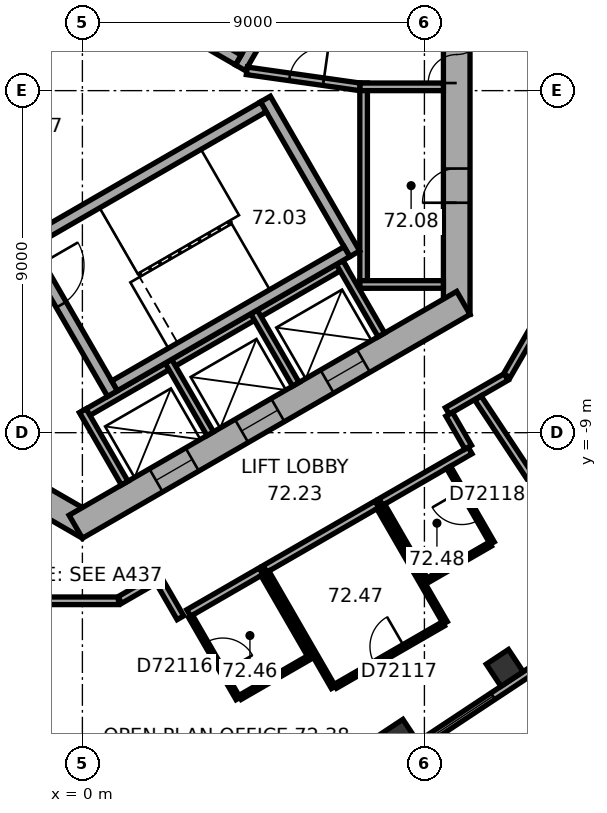
"""IFC4 building model, lengths in metres.
Left out: names, types, materials, properties, quantities, classifications, styles, units other than length and angle.
Written with IfcOpenShell. Run it as: python <this file> out.ifc"""

import sys

from ifc_helpers import new_model, si_unit, direction, frame, frame_2d, origin, origin_2d, place, context, subcontext, project, spatial, rectangle, extrude, element, fill, save


model = new_model("IFC4")
c1 = context("Model", 3, precision=1e-05, world=origin(), true_north=direction((0.0, 1.0)))
c2 = subcontext(c1, "Body", "Model", "MODEL_VIEW")
j1 = project(units=[si_unit("LENGTHUNIT", "METRE"), si_unit("PLANEANGLEUNIT", "RADIAN")], contexts=[c1])
p1 = place(None, origin())
s1 = spatial("IfcSite", under=j1, at=p1, CompositionType="ELEMENT")
p2 = place(p1, origin())
s2 = spatial("IfcBuilding", under=s1, at=p2, CompositionType="ELEMENT")
p3 = place(p2, frame((0.0, 0.0, 293.1)))
s3 = spatial("IfcBuildingStorey", under=s2, at=p3, CompositionType="ELEMENT", Elevation=293.1)
for number, where, z_axis, x_axis in (
    (1, (8.335, -17.028, 0.0), (0.0, 0.0, 1.0), (0.834, 0.552, 0.0)),
    (2, (11.113, -15.189, 0.0), (0.0, 0.0, 1.0), (0.834, 0.552, 0.0)),
):
    element("IfcColumn", number, at=place(p3, frame(where, z_axis=z_axis, x_axis=x_axis)), inside=s3, PredefinedType="COLUMN", context=c2, shape_type="SweptSolid", body=[
        extrude(rectangle(XDim=0.7, YDim=0.7, at=origin_2d()), origin(), (0.0, 0.0, 1.0), 3.7),
    ])
p4 = place(p3, frame((9.85, -5.889, 0.0), z_axis=(0.0, 0.0, 1.0), x_axis=(0.0, 1.0, 0.0)))
e3 = element("IfcWall", 3, at=p4, inside=s3, PredefinedType="SHEAR", context=c2, shape_type="SweptSolid", body=[
    extrude(rectangle(XDim=11.778, YDim=0.7, at=frame_2d((5.889, 0.0))), origin(), (0.0, 0.0, 1.0), 3.7),
])
p5 = place(p4, frame((6.089, 0.0, 0.0)))
e4 = element("IfcOpeningElement", 4, at=p5, cuts=e3, PredefinedType="OPENING", context=c2, shape_type="SweptSolid", body=[
    extrude(rectangle(XDim=1.5, YDim=2.1, at=frame_2d((0.75, 1.05))), frame((0.0, 0.36, 0.0), z_axis=(0.0, -1.0, 0.0), x_axis=(1.0, 0.0, 0.0)), (0.0, 0.0, 1.0), 0.72),
])
p6 = place(p4, frame((2.939, 0.0, 0.0)))
e5 = element("IfcOpeningElement", 5, at=p6, cuts=e3, PredefinedType="OPENING", context=c2, shape_type="SweptSolid", body=[
    extrude(rectangle(XDim=0.9, YDim=2.1, at=frame_2d((0.45, 1.05))), frame((0.0, 0.36, 0.0), z_axis=(0.0, -1.0, 0.0), x_axis=(1.0, 0.0, 0.0)), (0.0, 0.0, 1.0), 0.72),
])
p7 = place(p3, frame((-10.025, -5.586, 0.0), z_axis=(0.0, 0.0, 1.0), x_axis=(0.866026453023, -0.499998182661, 0.0)))
e6 = element("IfcWall", 6, at=p7, inside=s3, PredefinedType="SHEAR", context=c2, shape_type="SweptSolid", body=[
    extrude(rectangle(XDim=11.778, YDim=0.7, at=frame_2d((5.889, 0.0))), origin(), (0.0, 0.0, 1.0), 3.7),
])
p8 = place(p7, frame((6.089, 0.0, 0.0)))
e7 = element("IfcOpeningElement", 7, at=p8, cuts=e6, PredefinedType="OPENING", context=c2, shape_type="SweptSolid", body=[
    extrude(rectangle(XDim=1.5, YDim=2.1, at=frame_2d((0.75, 1.05))), frame((0.0, 0.36, 0.0), z_axis=(0.0, -1.0, 0.0), x_axis=(1.0, 0.0, 0.0)), (0.0, 0.0, 1.0), 0.72),
])
p9 = place(p7, frame((1.539, 0.0, 0.0)))
e8 = element("IfcOpeningElement", 8, at=p9, cuts=e6, PredefinedType="OPENING", context=c2, shape_type="SweptSolid", body=[
    extrude(rectangle(XDim=1.1, YDim=2.1, at=frame_2d((0.55, 1.05))), frame((0.0, 0.36, 0.0), z_axis=(0.0, -1.0, 0.0), x_axis=(1.0, 0.0, 0.0)), (0.0, 0.0, 1.0), 0.72),
])
p10 = place(p7, frame((4.139, 0.0, 0.0)))
e9 = element("IfcOpeningElement", 9, at=p10, cuts=e6, PredefinedType="OPENING", context=c2, shape_type="SweptSolid", body=[
    extrude(rectangle(XDim=1.1, YDim=2.1, at=frame_2d((0.55, 1.05))), frame((0.0, 0.36, 0.0), z_axis=(0.0, -1.0, 0.0), x_axis=(1.0, 0.0, 0.0)), (0.0, 0.0, 1.0), 0.72),
])
p11 = place(p3, frame((-0.175, -11.475, 0.0), z_axis=(0.0, 0.0, 1.0), x_axis=(0.866026453023, 0.499998182661, 0.0)))
e10 = element("IfcWall", 10, at=p11, inside=s3, PredefinedType="SHEAR", context=c2, shape_type="SweptSolid", body=[
    extrude(rectangle(XDim=11.778, YDim=0.7, at=frame_2d((5.889, 0.0))), origin(), (0.0, 0.0, 1.0), 3.7),
])
p12 = place(p11, frame((2.439, 0.0, 0.0)))
e11 = element("IfcOpeningElement", 11, at=p12, cuts=e10, PredefinedType="OPENING", context=c2, shape_type="SweptSolid", body=[
    extrude(rectangle(XDim=1.1, YDim=2.1, at=frame_2d((0.55, 1.05))), frame((0.0, 0.36, 0.0), z_axis=(0.0, -1.0, 0.0), x_axis=(1.0, 0.0, 0.0)), (0.0, 0.0, 1.0), 0.72),
])
p13 = place(p11, frame((5.039, 0.0, 0.0)))
e12 = element("IfcOpeningElement", 12, at=p13, cuts=e10, PredefinedType="OPENING", context=c2, shape_type="SweptSolid", body=[
    extrude(rectangle(XDim=1.1, YDim=2.1, at=frame_2d((0.55, 1.05))), frame((0.0, 0.36, 0.0), z_axis=(0.0, -1.0, 0.0), x_axis=(1.0, 0.0, 0.0)), (0.0, 0.0, 1.0), 0.72),
])
p14 = place(p11, frame((7.639, 0.0, 0.0)))
e13 = element("IfcOpeningElement", 13, at=p14, cuts=e10, PredefinedType="OPENING", context=c2, shape_type="SweptSolid", body=[
    extrude(rectangle(XDim=1.1, YDim=2.1, at=frame_2d((0.55, 1.05))), frame((0.0, 0.36, 0.0), z_axis=(0.0, -1.0, 0.0), x_axis=(1.0, 0.0, 0.0)), (0.0, 0.0, 1.0), 0.72),
])
p15 = place(p3, frame((2.58, -21.377, 0.0), z_axis=(0.0, 0.0, 1.0), x_axis=(0.833888592176, 0.551932800112, 0.0)))
e14 = element("IfcWall", 14, at=p15, inside=s3, PredefinedType="STANDARD", context=c2, shape_type="SweptSolid", body=[
    extrude(rectangle(XDim=17.731, YDim=0.2, at=frame_2d((8.866, 0.0))), origin(), (0.0, 0.0, 1.0), 3.7),
])
p16 = place(p15, frame((1.202, 0.0, 0.9)))
e15 = element("IfcOpeningElement", 15, at=p16, cuts=e14, PredefinedType="OPENING", context=c2, shape_type="SweptSolid", body=[
    extrude(rectangle(XDim=2.0, YDim=2.0, at=frame_2d((1.0, 1.0))), frame((0.0, 0.11, 0.0), z_axis=(0.0, -1.0, 0.0), x_axis=(1.0, 0.0, 0.0)), (0.0, 0.0, 1.0), 0.22),
])
p17 = place(p15, frame((4.533, 0.0, 0.9)))
e16 = element("IfcOpeningElement", 16, at=p17, cuts=e14, PredefinedType="OPENING", context=c2, shape_type="SweptSolid", body=[
    extrude(rectangle(XDim=2.0, YDim=2.0, at=frame_2d((1.0, 1.0))), frame((0.0, 0.11, 0.0), z_axis=(0.0, -1.0, 0.0), x_axis=(1.0, 0.0, 0.0)), (0.0, 0.0, 1.0), 0.22),
])
p18 = place(p15, frame((7.865, 0.0, 0.9)))
e17 = element("IfcOpeningElement", 17, at=p18, cuts=e14, PredefinedType="OPENING", context=c2, shape_type="SweptSolid", body=[
    extrude(rectangle(XDim=2.0, YDim=2.0, at=frame_2d((1.0, 1.0))), frame((0.0, 0.11, 0.0), z_axis=(0.0, -1.0, 0.0), x_axis=(1.0, 0.0, 0.0)), (0.0, 0.0, 1.0), 0.22),
])
p19 = place(p15, frame((11.197, 0.0, 0.9)))
e18 = element("IfcOpeningElement", 18, at=p19, cuts=e14, PredefinedType="OPENING", context=c2, shape_type="SweptSolid", body=[
    extrude(rectangle(XDim=2.0, YDim=2.0, at=frame_2d((1.0, 1.0))), frame((0.0, 0.11, 0.0), z_axis=(0.0, -1.0, 0.0), x_axis=(1.0, 0.0, 0.0)), (0.0, 0.0, 1.0), 0.22),
])
p20 = place(p15, frame((14.528, 0.0, 0.9)))
e19 = element("IfcOpeningElement", 19, at=p20, cuts=e14, PredefinedType="OPENING", context=c2, shape_type="SweptSolid", body=[
    extrude(rectangle(XDim=2.0, YDim=2.0, at=frame_2d((1.0, 1.0))), frame((0.0, 0.11, 0.0), z_axis=(0.0, -1.0, 0.0), x_axis=(1.0, 0.0, 0.0)), (0.0, 0.0, 1.0), 0.22),
])
p21 = place(p3, frame((7.4, -5.2, 0.0), z_axis=(0.0, 0.0, 1.0), x_axis=(0.0, 1.0, 0.0)))
e20 = element("IfcWall", 20, at=p21, inside=s3, PredefinedType="PARTITIONING", context=c2, shape_type="SweptSolid", body=[
    extrude(rectangle(XDim=5.4, YDim=0.2, at=frame_2d((2.7, 0.0))), origin(), (0.0, 0.0, 1.0), 3.42),
])
for number, where, z_axis, x_axis in (
    (21, (7.3, -5.1, 0.0), (0.0, 0.0, 1.0), (1.0, 0.0, 0.0)),
    (22, (7.3, 0.1, 0.0), (0.0, 0.0, 1.0), (1.0, 0.0, 0.0)),
):
    element("IfcWall", number, at=place(p3, frame(where, z_axis=z_axis, x_axis=x_axis)), inside=s3, PredefinedType="PARTITIONING", context=c2, shape_type="SweptSolid", body=[
        extrude(rectangle(XDim=2.2, YDim=0.2, at=frame_2d((1.1, 0.0))), origin(), (0.0, 0.0, 1.0), 3.42),
    ])
p22 = place(p3, frame((-0.024, -8.559, 0.0), z_axis=(0.0, 0.0, 1.0), x_axis=(0.866026010844, 0.49999894854, 0.0)))
e23 = element("IfcWall", 23, at=p22, inside=s3, PredefinedType="PARTITIONING", context=c2, shape_type="SweptSolid", body=[
    extrude(rectangle(XDim=8.0, YDim=0.2, at=frame_2d((4.0, 0.0))), origin(), (0.0, 0.0, 1.0), 3.42),
])
for number, where, z_axis, x_axis in (
    (24, (0.013, -8.422, 0.0), (0.0, 0.0, 1.0), (0.5, -0.866, 0.0)),
    (25, (2.264, -7.122, 0.0), (0.0, 0.0, 1.0), (0.5, -0.866, 0.0)),
    (26, (4.516, -5.822, 0.0), (0.0, 0.0, 1.0), (0.5, -0.866, 0.0)),
    (27, (6.768, -4.522, 0.0), (0.0, 0.0, 1.0), (0.5, -0.866, 0.0)),
):
    element("IfcWall", number, at=place(p3, frame(where, z_axis=z_axis, x_axis=x_axis)), inside=s3, PredefinedType="PARTITIONING", context=c2, shape_type="SweptSolid", body=[
        extrude(rectangle(XDim=2.2, YDim=0.2, at=frame_2d((1.1, 0.0))), origin(), (0.0, 0.0, 1.0), 3.42),
    ])
p23 = place(p3, frame((4.158, 0.602, 0.0), z_axis=(0.0, 0.0, 1.0), x_axis=(0.499977259774, 0.866038532462, 0.0)))
e28 = element("IfcWall", 28, at=p23, inside=s3, PredefinedType="SHEAR", context=c2, shape_type="SweptSolid", body=[
    extrude(rectangle(XDim=4.7, YDim=0.3, at=frame_2d((2.35, 0.0))), origin(), (0.0, 0.0, 1.0), 3.42),
])
p24 = place(p23, frame((0.8, 0.0, 0.0)))
e29 = element("IfcOpeningElement", 29, at=p24, cuts=e28, PredefinedType="OPENING", context=c2, shape_type="SweptSolid", body=[
    extrude(rectangle(XDim=1.2, YDim=2.1, at=frame_2d((0.6, 1.05))), frame((0.0, 0.16, 0.0), z_axis=(0.0, -1.0, 0.0), x_axis=(1.0, 0.0, 0.0)), (0.0, 0.0, 1.0), 0.32),
])
p25 = place(p3, frame((4.103, 0.807, 0.0), z_axis=(0.0, 0.0, 1.0), x_axis=(-0.866027801685, 0.499995846692, 0.0)))
e30 = element("IfcWall", 30, at=p25, inside=s3, PredefinedType="SHEAR", context=c2, shape_type="SweptSolid", body=[
    extrude(rectangle(XDim=7.06, YDim=0.3, at=frame_2d((3.53, 0.0))), origin(), (0.0, 0.0, 1.0), 3.42),
])
p26 = place(p3, frame((-1.558, -3.902, 0.0), z_axis=(0.0, 0.0, 1.0), x_axis=(0.499977259774, -0.866038532462, 0.0)))
e31 = element("IfcWall", 31, at=p26, inside=s3, PredefinedType="SHEAR", context=c2, shape_type="SweptSolid", body=[
    extrude(rectangle(XDim=4.7, YDim=0.3, at=frame_2d((2.35, 0.0))), origin(), (0.0, 0.0, 1.0), 3.42),
])
p27 = place(p26, frame((0.8, 0.0, 0.0)))
e32 = element("IfcOpeningElement", 32, at=p27, cuts=e31, PredefinedType="OPENING", context=c2, shape_type="SweptSolid", body=[
    extrude(rectangle(XDim=1.2, YDim=2.1, at=frame_2d((0.6, 1.05))), frame((0.0, 0.16, 0.0), z_axis=(0.0, -1.0, 0.0), x_axis=(1.0, 0.0, 0.0)), (0.0, 0.0, 1.0), 0.32),
])
p28 = place(p3, frame((4.816, -0.222, 0.0), z_axis=(0.0, 0.0, 1.0), x_axis=(0.499977259774, -0.866038532462, 0.0)))
e33 = element("IfcWall", 33, at=p28, inside=s3, PredefinedType="SHEAR", context=c2, shape_type="SweptSolid", body=[
    extrude(rectangle(XDim=4.7, YDim=0.3, at=frame_2d((2.35, 0.0))), origin(), (0.0, 0.0, 1.0), 3.42),
])
for number, where, z_axis, x_axis in (
    (34, (-1.353, -3.957, 0.0), (0.0, 0.0, 1.0), (0.866, 0.5, 0.0)),
    (35, (0.847, -7.767, 0.0), (0.0, 0.0, 1.0), (0.866, 0.5, 0.0)),
):
    element("IfcWall", number, at=place(p3, frame(where, z_axis=z_axis, x_axis=x_axis)), inside=s3, PredefinedType="SHEAR", context=c2, shape_type="SweptSolid", body=[
        extrude(rectangle(XDim=7.06, YDim=0.3, at=frame_2d((3.53, 0.0))), origin(), (0.0, 0.0, 1.0), 3.42),
    ])
p29 = place(p3, frame((4.327, 0.521, 0.0), z_axis=(0.0, 0.0, 1.0), x_axis=(0.990124376366, -0.14019172346, 0.0)))
e36 = element("IfcWall", 36, at=p29, inside=s3, PredefinedType="PARTITIONING", context=c2, shape_type="SweptSolid", body=[
    extrude(rectangle(XDim=3.002, YDim=0.2, at=frame_2d((1.501, 0.0))), origin(), (0.0, 0.0, 1.0), 3.42),
])
p30 = place(p29, frame((1.138, 0.0, 0.0)))
e37 = element("IfcOpeningElement", 37, at=p30, cuts=e36, PredefinedType="OPENING", context=c2, shape_type="SweptSolid", body=[
    extrude(rectangle(XDim=0.9, YDim=2.1, at=frame_2d((0.45, 1.05))), frame((0.0, 0.11, 0.0), z_axis=(0.0, -1.0, 0.0), x_axis=(1.0, 0.0, 0.0)), (0.0, 0.0, 1.0), 0.22),
])
p31 = place(p3, frame((-0.91, -13.423, 0.0), z_axis=(0.0, 0.0, 1.0), x_axis=(1.0, 0.0, 0.0)))
e38 = element("IfcWall", 38, at=p31, inside=s3, PredefinedType="PARTITIONING", context=c2, shape_type="SweptSolid", body=[
    extrude(rectangle(XDim=1.86, YDim=0.2, at=frame_2d((0.93, 0.0))), origin(), (0.0, 0.0, 1.0), 3.42),
])
p32 = place(p3, frame((0.985, -13.403, 0.0), z_axis=(0.0, 0.0, 1.0), x_axis=(0.866022668282, 0.500004737999, 0.0)))
e39 = element("IfcWall", 39, at=p32, inside=s3, PredefinedType="PARTITIONING", context=c2, shape_type="SweptSolid", body=[
    extrude(rectangle(XDim=1.148, YDim=0.2, at=frame_2d((0.574, 0.0))), origin(), (0.0, 0.0, 1.0), 3.42),
])
p33 = place(p3, frame((2.029, -12.916, 0.0), z_axis=(0.0, 0.0, 1.0), x_axis=(0.500074377092, -0.865982457891, 0.0)))
e40 = element("IfcWall", 40, at=p33, inside=s3, PredefinedType="PARTITIONING", context=c2, shape_type="SweptSolid", body=[
    extrude(rectangle(XDim=1.101, YDim=0.2, at=frame_2d((0.55, 0.0))), origin(), (0.0, 0.0, 1.0), 3.42),
])
p34 = place(p3, frame((2.796, -13.744, 0.0), z_axis=(0.0, 0.0, 1.0), x_axis=(0.86605622881, 0.499946605688, 0.0)))
e41 = element("IfcWall", 41, at=p34, inside=s3, PredefinedType="PARTITIONING", context=c2, shape_type="SweptSolid", body=[
    extrude(rectangle(XDim=2.2, YDim=0.2, at=frame_2d((1.1, 0.0))), origin(), (0.0, 0.0, 1.0), 3.42),
])
p35 = place(p3, frame((4.096, -15.996, 0.0), z_axis=(0.0, 0.0, 1.0), x_axis=(-0.500004234368, 0.866022959057, 0.0)))
e42 = element("IfcWall", 42, at=p35, inside=s3, PredefinedType="PARTITIONING", context=c2, shape_type="SweptSolid", body=[
    extrude(rectangle(XDim=2.5, YDim=0.12, at=frame_2d((1.25, 0.0))), origin(), (0.0, 0.0, 1.0), 3.42),
])
p36 = place(p35, frame((0.8, 0.0, 0.0)))
e43 = element("IfcOpeningElement", 43, at=p36, cuts=e42, PredefinedType="OPENING", context=c2, shape_type="SweptSolid", body=[
    extrude(rectangle(XDim=0.9, YDim=2.1, at=frame_2d((0.45, 1.05))), frame((0.0, 0.07, 0.0), z_axis=(0.0, -1.0, 0.0), x_axis=(1.0, 0.0, 0.0)), (0.0, 0.0, 1.0), 0.14),
])
p37 = place(p3, frame((4.751, -12.731, 0.0), z_axis=(0.0, 0.0, 1.0), x_axis=(0.500004234368, -0.866022959057, 0.0)))
e44 = element("IfcWall", 44, at=p37, inside=s3, PredefinedType="PARTITIONING", context=c2, shape_type="SweptSolid", body=[
    extrude(rectangle(XDim=2.5, YDim=0.12, at=frame_2d((1.25, 0.0))), origin(), (0.0, 0.0, 1.0), 3.42),
])
p38 = place(p3, frame((4.805, -12.584, 0.0), z_axis=(0.0, 0.0, 1.0), x_axis=(0.866038511948, 0.499977295307, 0.0)))
e45 = element("IfcWall", 45, at=p38, inside=s3, PredefinedType="PARTITIONING", context=c2, shape_type="SweptSolid", body=[
    extrude(rectangle(XDim=3.4, YDim=0.2, at=frame_2d((1.7, 0.0))), origin(), (0.0, 0.0, 1.0), 3.42),
])
p39 = place(p3, frame((5.949, -14.926, 0.0), z_axis=(0.0, 0.0, 1.0), x_axis=(-0.866039004929, -0.499976441387, 0.0)))
e46 = element("IfcWall", 46, at=p39, inside=s3, PredefinedType="PARTITIONING", context=c2, shape_type="SweptSolid", body=[
    extrude(rectangle(XDim=2.08, YDim=0.12, at=frame_2d((1.04, 0.0))), origin(), (0.0, 0.0, 1.0), 3.42),
])
for number, where, z_axis, x_axis in (
    (47, (6.605, -15.702, 0.0), (0.0, 0.0, 1.0), (-0.5, 0.866, 0.0)),
    (48, (7.8, -10.971, 0.0), (0.0, 0.0, 1.0), (0.5, -0.866, 0.0)),
):
    element("IfcWall", number, at=place(p3, frame(where, z_axis=z_axis, x_axis=x_axis)), inside=s3, PredefinedType="PARTITIONING", context=c2, shape_type="SweptSolid", body=[
        extrude(rectangle(XDim=3.5, YDim=0.12, at=frame_2d((1.75, 0.0))), origin(), (0.0, 0.0, 1.0), 3.42),
    ])
p40 = place(p3, frame((7.854, -10.824, 0.0), z_axis=(0.0, 0.0, 1.0), x_axis=(0.866029675718, 0.499992600721, 0.0)))
e49 = element("IfcWall", 49, at=p40, inside=s3, PredefinedType="PARTITIONING", context=c2, shape_type="SweptSolid", body=[
    extrude(rectangle(XDim=2.712, YDim=0.2, at=frame_2d((1.356, 0.0))), origin(), (0.0, 0.0, 1.0), 3.42),
])
p41 = place(p3, frame((9.053, -12.903, 0.0), z_axis=(0.0, 0.0, 1.0), x_axis=(-0.500031774688, 0.866007057882, 0.0)))
e50 = element("IfcWall", 50, at=p41, inside=s3, PredefinedType="PARTITIONING", context=c2, shape_type="SweptSolid", body=[
    extrude(rectangle(XDim=2.3, YDim=0.12, at=frame_2d((1.15, 0.0))), origin(), (0.0, 0.0, 1.0), 3.42),
])
p42 = place(p3, frame((9.498, -14.032, 0.0), z_axis=(0.0, 0.0, 1.0), x_axis=(-0.866040564224, -0.499973740429, 0.0)))
e51 = element("IfcWall", 51, at=p42, inside=s3, PredefinedType="PARTITIONING", context=c2, shape_type="SweptSolid", body=[
    extrude(rectangle(XDim=3.28, YDim=0.12, at=frame_2d((1.64, 0.0))), origin(), (0.0, 0.0, 1.0), 3.42),
])
p43 = place(p42, frame((1.19, 0.0, 0.0)))
e52 = element("IfcOpeningElement", 52, at=p43, cuts=e51, PredefinedType="OPENING", context=c2, shape_type="SweptSolid", body=[
    extrude(rectangle(XDim=0.9, YDim=2.1, at=frame_2d((0.45, 1.05))), frame((0.0, 0.07, 0.0), z_axis=(0.0, -1.0, 0.0), x_axis=(1.0, 0.0, 0.0)), (0.0, 0.0, 1.0), 0.14),
])
p44 = place(p3, frame((9.602, -8.428, 0.0), z_axis=(0.0, 0.0, 1.0), x_axis=(0.865999114786, 0.500045531117, 0.0)))
e53 = element("IfcWall", 53, at=p44, inside=s3, PredefinedType="PARTITIONING", context=c2, shape_type="SweptSolid", body=[
    extrude(rectangle(XDim=1.788, YDim=0.2, at=frame_2d((0.894, 0.0))), origin(), (0.0, 0.0, 1.0), 3.42),
])
p45 = place(p3, frame((9.635, -9.911, 0.0), z_axis=(0.0, 0.0, 1.0), x_axis=(0.499952165731, -0.866053019151, 0.0)))
e54 = element("IfcWall", 54, at=p45, inside=s3, PredefinedType="PARTITIONING", context=c2, shape_type="SweptSolid", body=[
    extrude(rectangle(XDim=2.3, YDim=0.12, at=frame_2d((1.15, 0.0))), origin(), (0.0, 0.0, 1.0), 3.42),
])
p46 = place(p45, frame((0.7, 0.0, 0.0)))
e55 = element("IfcOpeningElement", 55, at=p46, cuts=e54, PredefinedType="OPENING", context=c2, shape_type="SweptSolid", body=[
    extrude(rectangle(XDim=0.9, YDim=2.1, at=frame_2d((0.45, 1.05))), frame((0.0, 0.07, 0.0), z_axis=(0.0, -1.0, 0.0), x_axis=(1.0, 0.0, 0.0)), (0.0, 0.0, 1.0), 0.14),
])
p47 = place(p3, frame((10.152, -9.382, 0.0), z_axis=(0.0, 0.0, 1.0), x_axis=(-0.499968756647, 0.866043441391, 0.0)))
e56 = element("IfcWall", 56, at=p47, inside=s3, PredefinedType="PARTITIONING", context=c2, shape_type="SweptSolid", body=[
    extrude(rectangle(XDim=1.001, YDim=0.2, at=frame_2d((0.5, 0.0))), origin(), (0.0, 0.0, 1.0), 3.42),
])
p48 = place(p3, frame((10.733, -11.933, 0.0), z_axis=(0.0, 0.0, 1.0), x_axis=(-0.866012558475, -0.500022248069, 0.0)))
e57 = element("IfcWall", 57, at=p48, inside=s3, PredefinedType="PARTITIONING", context=c2, shape_type="SweptSolid", body=[
    extrude(rectangle(XDim=1.88, YDim=0.12, at=frame_2d((0.94, 0.0))), origin(), (0.0, 0.0, 1.0), 3.42),
])
p49 = place(p3, frame((11.17, -7.5, 0.0), z_axis=(0.0, 0.0, 1.0), x_axis=(0.500006454166, 0.866021677438, 0.0)))
e58 = element("IfcWall", 58, at=p49, inside=s3, PredefinedType="PARTITIONING", context=c2, shape_type="SweptSolid", body=[
    extrude(rectangle(XDim=1.86, YDim=0.2, at=frame_2d((0.93, 0.0))), origin(), (0.0, 0.0, 1.0), 3.42),
])
p50 = place(p3, frame((13.698, -13.059, 0.0), z_axis=(0.0, 0.0, 1.0), x_axis=(-0.551927229301, 0.833892279348, 0.0)))
e59 = element("IfcWall", 59, at=p50, inside=s3, PredefinedType="PARTITIONING", context=c2, shape_type="SweptSolid", body=[
    extrude(rectangle(XDim=5.96, YDim=0.2, at=frame_2d((2.98, 0.0))), origin(), (0.0, 0.0, 1.0), 2.87),
])
p51 = place(p18, origin())
e60 = element("IfcWindow", 60, at=p51, inside=s3, PartitioningType="SINGLE_PANEL", PredefinedType="WINDOW", context=c2, shape_type="SweptSolid", body=[
    extrude(rectangle(XDim=2.0, YDim=2.0, at=frame_2d((1.0, 1.0))), frame((0.0, 0.03, 0.0), z_axis=(0.0, -1.0, 0.0), x_axis=(1.0, 0.0, 0.0)), (0.0, 0.0, 1.0), 0.06),
])
fill(e17, e60)
p52 = place(p5, origin())
e61 = element("IfcDoor", 61, at=p52, inside=s3, OperationType="DOUBLE_DOOR_SINGLE_SWING", PredefinedType="DOOR", context=c2, shape_type="SweptSolid", body=[
    extrude(rectangle(XDim=1.5, YDim=2.1, at=frame_2d((0.75, 1.05))), frame((0.0, 0.025, 0.0), z_axis=(0.0, -1.0, 0.0), x_axis=(1.0, 0.0, 0.0)), (0.0, 0.0, 1.0), 0.05),
])
fill(e4, e61)
p53 = place(p27, origin())
e62 = element("IfcDoor", 62, at=p53, inside=s3, OperationType="SINGLE_SWING_RIGHT", PredefinedType="DOOR", context=c2, shape_type="SweptSolid", body=[
    extrude(rectangle(XDim=1.2, YDim=2.1, at=frame_2d((0.6, 1.05))), frame((0.0, 0.025, 0.0), z_axis=(0.0, -1.0, 0.0), x_axis=(1.0, 0.0, 0.0)), (0.0, 0.0, 1.0), 0.05),
])
fill(e32, e62)
p54 = place(p30, origin())
e63 = element("IfcDoor", 63, at=p54, inside=s3, OperationType="SINGLE_SWING_LEFT", PredefinedType="DOOR", context=c2, shape_type="SweptSolid", body=[
    extrude(rectangle(XDim=0.9, YDim=2.1, at=frame_2d((0.45, 1.05))), frame((0.0, 0.025, 0.0), z_axis=(0.0, -1.0, 0.0), x_axis=(1.0, 0.0, 0.0)), (0.0, 0.0, 1.0), 0.05),
])
fill(e37, e63)
p55 = place(p6, origin())
e64 = element("IfcDoor", 64, at=p55, inside=s3, OperationType="SINGLE_SWING_LEFT", PredefinedType="DOOR", context=c2, shape_type="SweptSolid", body=[
    extrude(rectangle(XDim=0.9, YDim=2.1, at=frame_2d((0.45, 1.05))), frame((0.0, 0.025, 0.0), z_axis=(0.0, -1.0, 0.0), x_axis=(1.0, 0.0, 0.0)), (0.0, 0.0, 1.0), 0.05),
])
fill(e5, e64)
p56 = place(p12, origin())
e65 = element("IfcDoor", 65, at=p56, inside=s3, OperationType="DOUBLE_DOOR_SLIDING", PredefinedType="DOOR", context=c2, shape_type="SweptSolid", body=[
    extrude(rectangle(XDim=1.1, YDim=2.1, at=frame_2d((0.55, 1.05))), frame((0.0, 0.025, 0.0), z_axis=(0.0, -1.0, 0.0), x_axis=(1.0, 0.0, 0.0)), (0.0, 0.0, 1.0), 0.05),
])
fill(e11, e65)
p57 = place(p13, origin())
e66 = element("IfcDoor", 66, at=p57, inside=s3, OperationType="DOUBLE_DOOR_SLIDING", PredefinedType="DOOR", context=c2, shape_type="SweptSolid", body=[
    extrude(rectangle(XDim=1.1, YDim=2.1, at=frame_2d((0.55, 1.05))), frame((0.0, 0.025, 0.0), z_axis=(0.0, -1.0, 0.0), x_axis=(1.0, 0.0, 0.0)), (0.0, 0.0, 1.0), 0.05),
])
fill(e12, e66)
p58 = place(p14, origin())
e67 = element("IfcDoor", 67, at=p58, inside=s3, OperationType="DOUBLE_DOOR_SLIDING", PredefinedType="DOOR", context=c2, shape_type="SweptSolid", body=[
    extrude(rectangle(XDim=1.1, YDim=2.1, at=frame_2d((0.55, 1.05))), frame((0.0, 0.025, 0.0), z_axis=(0.0, -1.0, 0.0), x_axis=(1.0, 0.0, 0.0)), (0.0, 0.0, 1.0), 0.05),
])
fill(e13, e67)
p59 = place(p36, origin())
e68 = element("IfcDoor", 68, at=p59, inside=s3, OperationType="SINGLE_SWING_LEFT", PredefinedType="DOOR", context=c2, shape_type="SweptSolid", body=[
    extrude(rectangle(XDim=0.9, YDim=2.1, at=frame_2d((0.45, 1.05))), frame((0.0, 0.025, 0.0), z_axis=(0.0, -1.0, 0.0), x_axis=(1.0, 0.0, 0.0)), (0.0, 0.0, 1.0), 0.05),
])
fill(e43, e68)
p60 = place(p43, origin())
e69 = element("IfcDoor", 69, at=p60, inside=s3, OperationType="SINGLE_SWING_LEFT", PredefinedType="DOOR", context=c2, shape_type="SweptSolid", body=[
    extrude(rectangle(XDim=0.9, YDim=2.1, at=frame_2d((0.45, 1.05))), frame((0.0, 0.025, 0.0), z_axis=(0.0, -1.0, 0.0), x_axis=(1.0, 0.0, 0.0)), (0.0, 0.0, 1.0), 0.05),
])
fill(e52, e69)
p61 = place(p46, origin())
e70 = element("IfcDoor", 70, at=p61, inside=s3, OperationType="SINGLE_SWING_LEFT", PredefinedType="DOOR", context=c2, shape_type="SweptSolid", body=[
    extrude(rectangle(XDim=0.9, YDim=2.1, at=frame_2d((0.45, 1.05))), frame((0.0, 0.025, 0.0), z_axis=(0.0, -1.0, 0.0), x_axis=(1.0, 0.0, 0.0)), (0.0, 0.0, 1.0), 0.05),
])
fill(e55, e70)
save(model, sys.argv[1])
